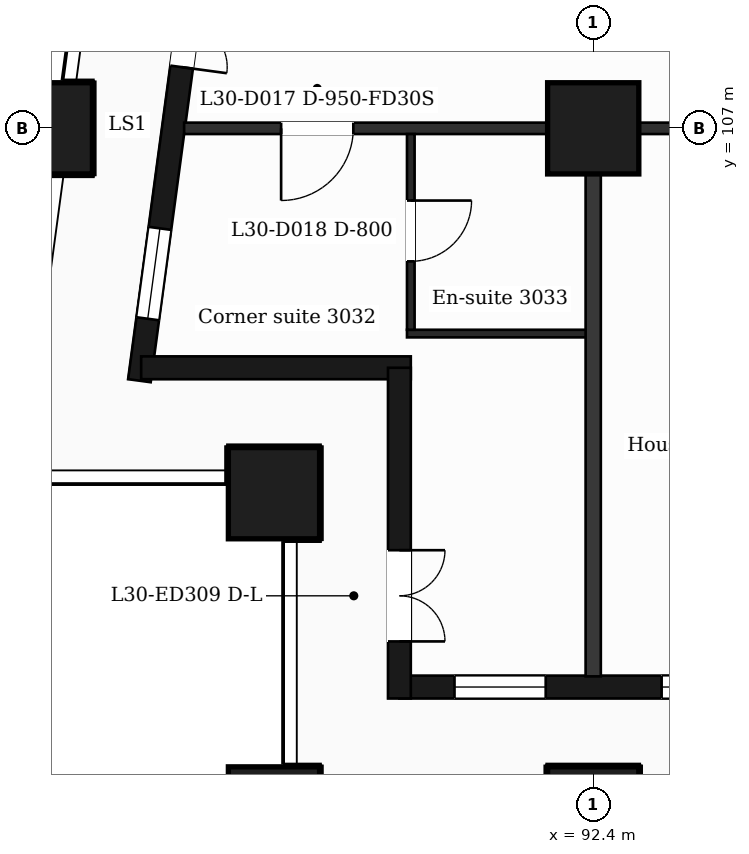
"""IFC4 building model, lengths in metres.
Left out: names, types, materials, properties, quantities, classifications, styles, units other than length and angle.
Written with IfcOpenShell. Run it as: python <this file> out.ifc"""

import sys

from ifc_helpers import new_model, si_unit, direction, frame, frame_2d, origin, origin_2d, place, context, subcontext, project, spatial, rectangle, extrude, element, fill, save


model = new_model("IFC4")
c1 = context("Model", 3, precision=1e-05, world=origin(), true_north=direction((0.0, 1.0)))
c2 = subcontext(c1, "Body", "Model", "MODEL_VIEW")
j1 = project(units=[si_unit("LENGTHUNIT", "METRE"), si_unit("PLANEANGLEUNIT", "RADIAN")], contexts=[c1])
p1 = place(None, origin())
s1 = spatial("IfcSite", under=j1, at=p1, CompositionType="ELEMENT")
p2 = place(p1, origin())
s2 = spatial("IfcBuilding", under=s1, at=p2, CompositionType="ELEMENT")
p3 = place(p2, frame((0.0, 0.0, 128.0)))
s3 = spatial("IfcBuildingStorey", under=s2, at=p3, CompositionType="ELEMENT", Elevation=128.0)
for number, where, z_axis, x_axis in (
    (1, (92.4, 98.0, 0.0), (0.0, 0.0, 1.0), (1.0, 0.0, 0.0)),
    (2, (88.2, 98.0, 0.0), (0.0, 0.0, 1.0), (1.0, 0.0, 0.0)),
    (3, (88.2, 102.2, 0.0), (0.0, 0.0, 1.0), (1.0, 0.0, 0.0)),
    (4, (92.4, 107.0, 0.0), (0.0, 0.0, 1.0), (1.0, 0.0, 0.0)),
    (5, (85.211, 107.0, 0.0), (0.0, 0.0, 1.0), (1.0, 0.0, 0.0)),
):
    element("IfcColumn", number, at=place(p3, frame(where, z_axis=z_axis, x_axis=x_axis)), inside=s3, PredefinedType="COLUMN", context=c2, shape_type="SweptSolid", body=[
        extrude(rectangle(XDim=1.2, YDim=1.2, at=origin_2d()), origin(), (0.0, 0.0, 1.0), 3.7),
    ])
p4 = place(p3, frame((89.85, 99.65, 0.0), z_axis=(0.0, 0.0, 1.0), x_axis=(1.0, 0.0, 0.0)))
e6 = element("IfcWall", 6, at=p4, inside=s3, PredefinedType="SOLIDWALL", context=c2, shape_type="SweptSolid", body=[
    extrude(rectangle(XDim=47.25, YDim=0.3, at=frame_2d((23.625, 0.0))), origin(), (0.0, 0.0, 1.0), 3.38),
])
p5 = place(p4, frame((0.725, 0.0, 0.9)))
e7 = element("IfcOpeningElement", 7, at=p5, cuts=e6, PredefinedType="OPENING", context=c2, shape_type="SweptSolid", body=[
    extrude(rectangle(XDim=1.2, YDim=2.1, at=frame_2d((0.6, 1.05))), frame((0.0, 0.16, 0.0), z_axis=(0.0, -1.0, 0.0), x_axis=(1.0, 0.0, 0.0)), (0.0, 0.0, 1.0), 0.32),
])
p6 = place(p4, frame((3.45, 0.0, 0.9)))
e8 = element("IfcOpeningElement", 8, at=p6, cuts=e6, PredefinedType="OPENING", context=c2, shape_type="SweptSolid", body=[
    extrude(rectangle(XDim=2.4, YDim=2.1, at=frame_2d((1.2, 1.05))), frame((0.0, 0.16, 0.0), z_axis=(0.0, -1.0, 0.0), x_axis=(1.0, 0.0, 0.0)), (0.0, 0.0, 1.0), 0.32),
])
p7 = place(p4, frame((8.25, 0.0, 0.9)))
e9 = element("IfcOpeningElement", 9, at=p7, cuts=e6, PredefinedType="OPENING", context=c2, shape_type="SweptSolid", body=[
    extrude(rectangle(XDim=1.2, YDim=2.1, at=frame_2d((0.6, 1.05))), frame((0.0, 0.16, 0.0), z_axis=(0.0, -1.0, 0.0), x_axis=(1.0, 0.0, 0.0)), (0.0, 0.0, 1.0), 0.32),
])
p8 = place(p4, frame((12.45, 0.0, 0.9)))
e10 = element("IfcOpeningElement", 10, at=p8, cuts=e6, PredefinedType="OPENING", context=c2, shape_type="SweptSolid", body=[
    extrude(rectangle(XDim=1.2, YDim=2.1, at=frame_2d((0.6, 1.05))), frame((0.0, 0.16, 0.0), z_axis=(0.0, -1.0, 0.0), x_axis=(1.0, 0.0, 0.0)), (0.0, 0.0, 1.0), 0.32),
])
p9 = place(p4, frame((16.05, 0.0, 0.9)))
e11 = element("IfcOpeningElement", 11, at=p9, cuts=e6, PredefinedType="OPENING", context=c2, shape_type="SweptSolid", body=[
    extrude(rectangle(XDim=2.4, YDim=2.1, at=frame_2d((1.2, 1.05))), frame((0.0, 0.16, 0.0), z_axis=(0.0, -1.0, 0.0), x_axis=(1.0, 0.0, 0.0)), (0.0, 0.0, 1.0), 0.32),
])
p10 = place(p4, frame((20.25, 0.0, 0.9)))
e12 = element("IfcOpeningElement", 12, at=p10, cuts=e6, PredefinedType="OPENING", context=c2, shape_type="SweptSolid", body=[
    extrude(rectangle(XDim=2.4, YDim=2.1, at=frame_2d((1.2, 1.05))), frame((0.0, 0.16, 0.0), z_axis=(0.0, -1.0, 0.0), x_axis=(1.0, 0.0, 0.0)), (0.0, 0.0, 1.0), 0.32),
])
p11 = place(p4, frame((25.05, 0.0, 0.0)))
e13 = element("IfcOpeningElement", 13, at=p11, cuts=e6, PredefinedType="OPENING", context=c2, shape_type="SweptSolid", body=[
    extrude(rectangle(XDim=1.2, YDim=2.4, at=frame_2d((0.6, 1.2))), frame((0.0, 0.16, 0.0), z_axis=(0.0, -1.0, 0.0), x_axis=(1.0, 0.0, 0.0)), (0.0, 0.0, 1.0), 0.32),
])
p12 = place(p4, frame((28.65, 0.0, 0.9)))
e14 = element("IfcOpeningElement", 14, at=p12, cuts=e6, PredefinedType="OPENING", context=c2, shape_type="SweptSolid", body=[
    extrude(rectangle(XDim=2.4, YDim=2.1, at=frame_2d((1.2, 1.05))), frame((0.0, 0.16, 0.0), z_axis=(0.0, -1.0, 0.0), x_axis=(1.0, 0.0, 0.0)), (0.0, 0.0, 1.0), 0.32),
])
p13 = place(p4, frame((32.85, 0.0, 0.9)))
e15 = element("IfcOpeningElement", 15, at=p13, cuts=e6, PredefinedType="OPENING", context=c2, shape_type="SweptSolid", body=[
    extrude(rectangle(XDim=2.4, YDim=2.1, at=frame_2d((1.2, 1.05))), frame((0.0, 0.16, 0.0), z_axis=(0.0, -1.0, 0.0), x_axis=(1.0, 0.0, 0.0)), (0.0, 0.0, 1.0), 0.32),
])
p14 = place(p4, frame((37.65, 0.0, 0.9)))
e16 = element("IfcOpeningElement", 16, at=p14, cuts=e6, PredefinedType="OPENING", context=c2, shape_type="SweptSolid", body=[
    extrude(rectangle(XDim=1.2, YDim=2.1, at=frame_2d((0.6, 1.05))), frame((0.0, 0.16, 0.0), z_axis=(0.0, -1.0, 0.0), x_axis=(1.0, 0.0, 0.0)), (0.0, 0.0, 1.0), 0.32),
])
p15 = place(p4, frame((41.85, 0.0, 0.9)))
e17 = element("IfcOpeningElement", 17, at=p15, cuts=e6, PredefinedType="OPENING", context=c2, shape_type="SweptSolid", body=[
    extrude(rectangle(XDim=1.2, YDim=2.1, at=frame_2d((0.6, 1.05))), frame((0.0, 0.16, 0.0), z_axis=(0.0, -1.0, 0.0), x_axis=(1.0, 0.0, 0.0)), (0.0, 0.0, 1.0), 0.32),
])
p16 = place(p4, frame((45.25, 0.0, 0.9)))
e18 = element("IfcOpeningElement", 18, at=p16, cuts=e6, PredefinedType="OPENING", context=c2, shape_type="SweptSolid", body=[
    extrude(rectangle(XDim=1.2, YDim=2.1, at=frame_2d((0.6, 1.05))), frame((0.0, 0.16, 0.0), z_axis=(0.0, -1.0, 0.0), x_axis=(1.0, 0.0, 0.0)), (0.0, 0.0, 1.0), 0.32),
])
p17 = place(p3, frame((87.334, 110.4, 0.0), z_axis=(0.0, 0.0, 1.0), x_axis=(-0.133437175554, -0.991057273915, 0.0)))
e19 = element("IfcWall", 19, at=p17, inside=s3, PredefinedType="SOLIDWALL", context=c2, shape_type="SweptSolid", body=[
    extrude(rectangle(XDim=6.781, YDim=0.3, at=frame_2d((3.39, 0.0))), origin(), (0.0, 0.0, 1.0), 3.38),
])
p18 = place(p17, frame((1.418, 0.0, 0.0)))
e20 = element("IfcOpeningElement", 20, at=p18, cuts=e19, PredefinedType="OPENING", context=c2, shape_type="SweptSolid", body=[
    extrude(rectangle(XDim=1.2, YDim=2.4, at=frame_2d((0.6, 1.2))), frame((0.0, 0.16, 0.0), z_axis=(0.0, -1.0, 0.0), x_axis=(1.0, 0.0, 0.0)), (0.0, 0.0, 1.0), 0.32),
])
p19 = place(p17, frame((4.758, 0.0, 0.9)))
e21 = element("IfcOpeningElement", 21, at=p19, cuts=e19, PredefinedType="OPENING", context=c2, shape_type="SweptSolid", body=[
    extrude(rectangle(XDim=1.2, YDim=2.1, at=frame_2d((0.6, 1.05))), frame((0.0, 0.16, 0.0), z_axis=(0.0, -1.0, 0.0), x_axis=(1.0, 0.0, 0.0)), (0.0, 0.0, 1.0), 0.32),
])
p20 = place(p3, frame((86.452, 103.85, 0.0), z_axis=(0.0, 0.0, 1.0), x_axis=(1.0, 0.0, 0.0)))
e22 = element("IfcWall", 22, at=p20, inside=s3, PredefinedType="SOLIDWALL", context=c2, shape_type="SweptSolid", body=[
    extrude(rectangle(XDim=3.548, YDim=0.3, at=frame_2d((1.774, 0.0))), origin(), (0.0, 0.0, 1.0), 3.38),
])
p21 = place(p3, frame((89.85, 103.85, 0.0), z_axis=(0.0, 0.0, 1.0), x_axis=(0.0, -1.0, 0.0)))
e23 = element("IfcWall", 23, at=p21, inside=s3, PredefinedType="SOLIDWALL", context=c2, shape_type="SweptSolid", body=[
    extrude(rectangle(XDim=4.35, YDim=0.3, at=frame_2d((2.175, 0.0))), origin(), (0.0, 0.0, 1.0), 3.38),
])
p22 = place(p21, frame((2.4, 0.0, 0.0)))
e24 = element("IfcOpeningElement", 24, at=p22, cuts=e23, PredefinedType="OPENING", context=c2, shape_type="SweptSolid", body=[
    extrude(rectangle(XDim=1.2, YDim=2.4, at=frame_2d((0.6, 1.2))), frame((0.0, 0.16, 0.0), z_axis=(0.0, -1.0, 0.0), x_axis=(1.0, 0.0, 0.0)), (0.0, 0.0, 1.0), 0.32),
])
p23 = place(p3, frame((89.95, 104.3, 0.0), z_axis=(0.0, 0.0, 1.0), x_axis=(1.0, 0.0, 0.0)))
e25 = element("IfcWall", 25, at=p23, inside=s3, PredefinedType="PARTITIONING", context=c2, shape_type="SweptSolid", body=[
    extrude(rectangle(XDim=2.45, YDim=0.1, at=frame_2d((1.225, 0.0))), origin(), (0.0, 0.0, 1.0), 3.38),
])
p24 = place(p3, frame((87.018, 107.0, 0.0), z_axis=(0.0, 0.0, 1.0), x_axis=(1.0, 0.0, 0.0)))
e26 = element("IfcWall", 26, at=p24, inside=s3, PredefinedType="PARTITIONING", context=c2, shape_type="SweptSolid", body=[
    extrude(rectangle(XDim=52.765, YDim=0.15, at=frame_2d((26.382, 0.0))), origin(), (0.0, 0.0, 1.0), 3.38),
])
p25 = place(p24, frame((1.276, 0.0, 0.0)))
e27 = element("IfcOpeningElement", 27, at=p25, cuts=e26, PredefinedType="OPENING", context=c2, shape_type="SweptSolid", body=[
    extrude(rectangle(XDim=0.95, YDim=2.1, at=frame_2d((0.475, 1.05))), frame((0.0, 0.085, 0.0), z_axis=(0.0, -1.0, 0.0), x_axis=(1.0, 0.0, 0.0)), (0.0, 0.0, 1.0), 0.17),
])
p26 = place(p24, frame((7.645, 0.0, 0.0)))
e28 = element("IfcOpeningElement", 28, at=p26, cuts=e26, PredefinedType="OPENING", context=c2, shape_type="SweptSolid", body=[
    extrude(rectangle(XDim=0.95, YDim=2.1, at=frame_2d((0.475, 1.05))), frame((0.0, 0.085, 0.0), z_axis=(0.0, -1.0, 0.0), x_axis=(1.0, 0.0, 0.0)), (0.0, 0.0, 1.0), 0.17),
])
p27 = place(p24, frame((16.812, 0.0, 0.0)))
e29 = element("IfcOpeningElement", 29, at=p27, cuts=e26, PredefinedType="OPENING", context=c2, shape_type="SweptSolid", body=[
    extrude(rectangle(XDim=1.0, YDim=2.1, at=frame_2d((0.5, 1.05))), frame((0.0, 0.085, 0.0), z_axis=(0.0, -1.0, 0.0), x_axis=(1.0, 0.0, 0.0)), (0.0, 0.0, 1.0), 0.17),
])
p28 = place(p24, frame((22.952, 0.0, 0.0)))
e30 = element("IfcOpeningElement", 30, at=p28, cuts=e26, PredefinedType="OPENING", context=c2, shape_type="SweptSolid", body=[
    extrude(rectangle(XDim=0.95, YDim=2.1, at=frame_2d((0.475, 1.05))), frame((0.0, 0.085, 0.0), z_axis=(0.0, -1.0, 0.0), x_axis=(1.0, 0.0, 0.0)), (0.0, 0.0, 1.0), 0.17),
])
p29 = place(p24, frame((31.742, 0.0, 0.0)))
e31 = element("IfcOpeningElement", 31, at=p29, cuts=e26, PredefinedType="OPENING", context=c2, shape_type="SweptSolid", body=[
    extrude(rectangle(XDim=0.95, YDim=2.1, at=frame_2d((0.475, 1.05))), frame((0.0, 0.085, 0.0), z_axis=(0.0, -1.0, 0.0), x_axis=(1.0, 0.0, 0.0)), (0.0, 0.0, 1.0), 0.17),
])
p30 = place(p24, frame((35.169, 0.0, 0.0)))
e32 = element("IfcOpeningElement", 32, at=p30, cuts=e26, PredefinedType="OPENING", context=c2, shape_type="SweptSolid", body=[
    extrude(rectangle(XDim=0.95, YDim=2.1, at=frame_2d((0.475, 1.05))), frame((0.0, 0.085, 0.0), z_axis=(0.0, -1.0, 0.0), x_axis=(1.0, 0.0, 0.0)), (0.0, 0.0, 1.0), 0.17),
])
p31 = place(p24, frame((41.807, 0.0, 0.0)))
e33 = element("IfcOpeningElement", 33, at=p31, cuts=e26, PredefinedType="OPENING", context=c2, shape_type="SweptSolid", body=[
    extrude(rectangle(XDim=0.95, YDim=2.1, at=frame_2d((0.475, 1.05))), frame((0.0, 0.085, 0.0), z_axis=(0.0, -1.0, 0.0), x_axis=(1.0, 0.0, 0.0)), (0.0, 0.0, 1.0), 0.17),
])
p32 = place(p24, frame((43.832, 0.0, 0.0)))
e34 = element("IfcOpeningElement", 34, at=p32, cuts=e26, PredefinedType="OPENING", context=c2, shape_type="SweptSolid", body=[
    extrude(rectangle(XDim=0.95, YDim=2.1, at=frame_2d((0.475, 1.05))), frame((0.0, 0.085, 0.0), z_axis=(0.0, -1.0, 0.0), x_axis=(1.0, 0.0, 0.0)), (0.0, 0.0, 1.0), 0.17),
])
p33 = place(p24, frame((48.974, 0.0, 0.0)))
e35 = element("IfcOpeningElement", 35, at=p33, cuts=e26, PredefinedType="OPENING", context=c2, shape_type="SweptSolid", body=[
    extrude(rectangle(XDim=0.95, YDim=2.1, at=frame_2d((0.475, 1.05))), frame((0.0, 0.085, 0.0), z_axis=(0.0, -1.0, 0.0), x_axis=(1.0, 0.0, 0.0)), (0.0, 0.0, 1.0), 0.17),
])
p34 = place(p3, frame((90.0, 104.35, 0.0), z_axis=(0.0, 0.0, 1.0), x_axis=(0.0, 1.0, 0.0)))
e36 = element("IfcWall", 36, at=p34, inside=s3, PredefinedType="PARTITIONING", context=c2, shape_type="SweptSolid", body=[
    extrude(rectangle(XDim=2.575, YDim=0.1, at=frame_2d((1.288, 0.0))), origin(), (0.0, 0.0, 1.0), 3.38),
])
p35 = place(p34, frame((0.9, 0.0, 0.0)))
e37 = element("IfcOpeningElement", 37, at=p35, cuts=e36, PredefinedType="OPENING", context=c2, shape_type="SweptSolid", body=[
    extrude(rectangle(XDim=0.8, YDim=2.1, at=frame_2d((0.4, 1.05))), frame((0.0, 0.06, 0.0), z_axis=(0.0, -1.0, 0.0), x_axis=(1.0, 0.0, 0.0)), (0.0, 0.0, 1.0), 0.12),
])
p36 = place(p3, frame((92.4, 99.79, 0.0), z_axis=(0.0, 0.0, 1.0), x_axis=(0.0, 1.0, 0.0)))
e38 = element("IfcWall", 38, at=p36, inside=s3, PredefinedType="PARTITIONING", context=c2, shape_type="SweptSolid", body=[
    extrude(rectangle(XDim=7.135, YDim=0.2, at=frame_2d((3.567, 0.0))), origin(), (0.0, 0.0, 1.0), 3.38),
])
p37 = place(p5, origin())
e39 = element("IfcWindow", 39, at=p37, inside=s3, PartitioningType="SINGLE_PANEL", PredefinedType="WINDOW", context=c2, shape_type="SweptSolid", body=[
    extrude(rectangle(XDim=1.2, YDim=2.1, at=frame_2d((0.6, 1.05))), frame((0.0, 0.03, 0.0), z_axis=(0.0, -1.0, 0.0), x_axis=(1.0, 0.0, 0.0)), (0.0, 0.0, 1.0), 0.06),
])
fill(e7, e39)
p38 = place(p6, origin())
e40 = element("IfcWindow", 40, at=p38, inside=s3, PartitioningType="SINGLE_PANEL", PredefinedType="WINDOW", context=c2, shape_type="SweptSolid", body=[
    extrude(rectangle(XDim=2.4, YDim=2.1, at=frame_2d((1.2, 1.05))), frame((0.0, 0.03, 0.0), z_axis=(0.0, -1.0, 0.0), x_axis=(1.0, 0.0, 0.0)), (0.0, 0.0, 1.0), 0.06),
])
fill(e8, e40)
p39 = place(p18, origin())
e41 = element("IfcDoor", 41, at=p39, inside=s3, OperationType="DOUBLE_DOOR_SINGLE_SWING", PredefinedType="DOOR", context=c2, shape_type="SweptSolid", body=[
    extrude(rectangle(XDim=1.2, YDim=2.4, at=frame_2d((0.6, 1.2))), frame((0.0, 0.025, 0.0), z_axis=(0.0, -1.0, 0.0), x_axis=(1.0, 0.0, 0.0)), (0.0, 0.0, 1.0), 0.05),
])
fill(e20, e41)
p40 = place(p19, origin())
e42 = element("IfcWindow", 42, at=p40, inside=s3, PartitioningType="SINGLE_PANEL", PredefinedType="WINDOW", context=c2, shape_type="SweptSolid", body=[
    extrude(rectangle(XDim=1.2, YDim=2.1, at=frame_2d((0.6, 1.05))), frame((0.0, 0.03, 0.0), z_axis=(0.0, -1.0, 0.0), x_axis=(1.0, 0.0, 0.0)), (0.0, 0.0, 1.0), 0.06),
])
fill(e21, e42)
p41 = place(p22, origin())
e43 = element("IfcDoor", 43, at=p41, inside=s3, OperationType="DOUBLE_DOOR_SINGLE_SWING", PredefinedType="DOOR", context=c2, shape_type="SweptSolid", body=[
    extrude(rectangle(XDim=1.2, YDim=2.4, at=frame_2d((0.6, 1.2))), frame((0.0, 0.025, 0.0), z_axis=(0.0, -1.0, 0.0), x_axis=(1.0, 0.0, 0.0)), (0.0, 0.0, 1.0), 0.05),
])
fill(e24, e43)
p42 = place(p25, origin())
e44 = element("IfcDoor", 44, at=p42, inside=s3, OperationType="SINGLE_SWING_LEFT", PredefinedType="DOOR", context=c2, shape_type="SweptSolid", body=[
    extrude(rectangle(XDim=0.95, YDim=2.1, at=frame_2d((0.475, 1.05))), frame((0.0, 0.025, 0.0), z_axis=(0.0, -1.0, 0.0), x_axis=(1.0, 0.0, 0.0)), (0.0, 0.0, 1.0), 0.05),
])
fill(e27, e44)
p43 = place(p35, origin())
e45 = element("IfcDoor", 45, at=p43, inside=s3, OperationType="SINGLE_SWING_RIGHT", PredefinedType="DOOR", context=c2, shape_type="SweptSolid", body=[
    extrude(rectangle(XDim=0.8, YDim=2.1, at=frame_2d((0.4, 1.05))), frame((0.0, 0.025, 0.0), z_axis=(0.0, -1.0, 0.0), x_axis=(1.0, 0.0, 0.0)), (0.0, 0.0, 1.0), 0.05),
])
fill(e37, e45)
save(model, sys.argv[1])
